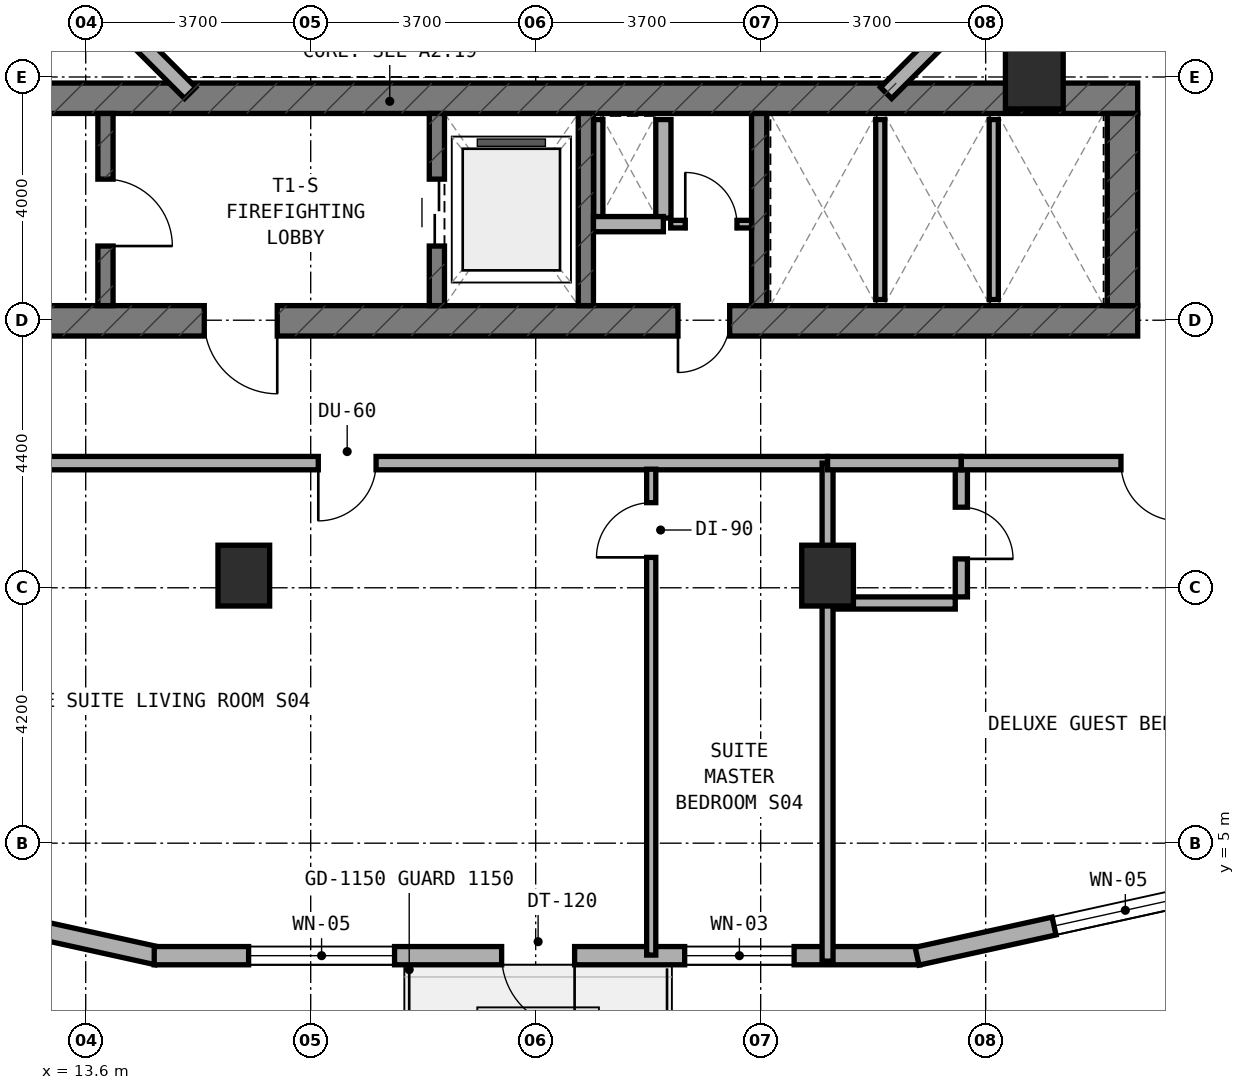
"""IFC4 building model, lengths in metres.
Left out: names, types, materials, properties, quantities, classifications, styles, units other than length and angle.
Written with IfcOpenShell. Run it as: python <this file> out.ifc"""

import sys

from ifc_helpers import new_model, si_unit, direction, frame, frame_2d, origin, origin_2d, place, context, subcontext, project, spatial, rectangle, extrude, element, fill, save


model = new_model("IFC4")
c1 = context("Model", 3, precision=1e-05, world=origin(), true_north=direction((0.0, 1.0)))
c2 = subcontext(c1, "Body", "Model", "MODEL_VIEW")
j1 = project(units=[si_unit("LENGTHUNIT", "METRE"), si_unit("PLANEANGLEUNIT", "RADIAN")], contexts=[c1])
p1 = place(None, origin())
s1 = spatial("IfcSite", under=j1, at=p1, CompositionType="ELEMENT")
p2 = place(p1, origin())
s2 = spatial("IfcBuilding", under=s1, at=p2, CompositionType="ELEMENT")
p3 = place(p2, frame((0.0, 0.0, 80.0)))
s3 = spatial("IfcBuildingStorey", under=s2, at=p3, CompositionType="ELEMENT", Elevation=80.0)
p4 = place(p3, frame((6.3, 13.59, 0.0), z_axis=(0.0, 0.0, 1.0), x_axis=(1.0, 0.0, 0.0)))
e1 = element("IfcWall", 1, at=p4, inside=s3, PredefinedType="SHEAR", context=c2, shape_type="SweptSolid", body=[
    extrude(rectangle(XDim=24.6, YDim=0.5, at=frame_2d((12.3, 0.0))), origin(), (0.0, 0.0, 1.0), 3.5),
])
p5 = place(p4, frame((9.25, 0.0, 0.0)))
e2 = element("IfcOpeningElement", 2, at=p5, cuts=e1, PredefinedType="OPENING", context=c2, shape_type="SweptSolid", body=[
    extrude(rectangle(XDim=1.2, YDim=2.15, at=frame_2d((0.6, 1.075))), frame((0.0, 0.26, 0.0), z_axis=(0.0, -1.0, 0.0), x_axis=(1.0, 0.0, 0.0)), (0.0, 0.0, 1.0), 0.52),
])
p6 = place(p4, frame((17.04, 0.0, 0.0)))
e3 = element("IfcOpeningElement", 3, at=p6, cuts=e1, PredefinedType="OPENING", context=c2, shape_type="SweptSolid", body=[
    extrude(rectangle(XDim=0.85, YDim=2.1, at=frame_2d((0.425, 1.05))), frame((0.0, 0.26, 0.0), z_axis=(0.0, -1.0, 0.0), x_axis=(1.0, 0.0, 0.0)), (0.0, 0.0, 1.0), 0.52),
])
p7 = place(p3, frame((6.3, 17.25, 0.0), z_axis=(0.0, 0.0, 1.0), x_axis=(1.0, 0.0, 0.0)))
e4 = element("IfcWall", 4, at=p7, inside=s3, PredefinedType="SHEAR", context=c2, shape_type="SweptSolid", body=[
    extrude(rectangle(XDim=24.6, YDim=0.5, at=frame_2d((12.3, 0.0))), origin(), (0.0, 0.0, 1.0), 3.5),
])
p8 = place(p3, frame((30.65, 13.84, 0.0), z_axis=(0.0, 0.0, 1.0), x_axis=(0.0, 1.0, 0.0)))
e5 = element("IfcWall", 5, at=p8, inside=s3, PredefinedType="SHEAR", context=c2, shape_type="SweptSolid", body=[
    extrude(rectangle(XDim=3.16, YDim=0.5, at=frame_2d((1.58, 0.0))), origin(), (0.0, 0.0, 1.0), 3.5),
])
p9 = place(p3, frame((13.925, 13.84, 0.0), z_axis=(0.0, 0.0, 1.0), x_axis=(0.0, 1.0, 0.0)))
e6 = element("IfcWall", 6, at=p9, inside=s3, PredefinedType="STANDARD", context=c2, shape_type="SweptSolid", body=[
    extrude(rectangle(XDim=3.16, YDim=0.25, at=frame_2d((1.58, 0.0))), origin(), (0.0, 0.0, 1.0), 3.22),
])
p10 = place(p9, frame((0.98, 0.0, 0.0)))
e7 = element("IfcOpeningElement", 7, at=p10, cuts=e6, PredefinedType="OPENING", context=c2, shape_type="SweptSolid", body=[
    extrude(rectangle(XDim=1.1, YDim=2.15, at=frame_2d((0.55, 1.075))), frame((0.0, 0.135, 0.0), z_axis=(0.0, -1.0, 0.0), x_axis=(1.0, 0.0, 0.0)), (0.0, 0.0, 1.0), 0.27),
])
p11 = place(p3, frame((19.375, 13.84, 0.0), z_axis=(0.0, 0.0, 1.0), x_axis=(0.0, 1.0, 0.0)))
e8 = element("IfcWall", 8, at=p11, inside=s3, PredefinedType="STANDARD", context=c2, shape_type="SweptSolid", body=[
    extrude(rectangle(XDim=3.16, YDim=0.25, at=frame_2d((1.58, 0.0))), origin(), (0.0, 0.0, 1.0), 3.22),
])
p12 = place(p11, frame((0.98, 0.0, 0.0)))
e9 = element("IfcOpeningElement", 9, at=p12, cuts=e8, PredefinedType="OPENING", context=c2, shape_type="SweptSolid", body=[
    extrude(rectangle(XDim=1.1, YDim=2.15, at=frame_2d((0.55, 1.075))), frame((0.0, 0.135, 0.0), z_axis=(0.0, -1.0, 0.0), x_axis=(1.0, 0.0, 0.0)), (0.0, 0.0, 1.0), 0.27),
])
for number, where, z_axis, x_axis in (
    (10, (21.825, 13.84, 0.0), (0.0, 0.0, 1.0), (0.0, 1.0, 0.0)),
    (11, (24.675, 13.84, 0.0), (0.0, 0.0, 1.0), (0.0, 1.0, 0.0)),
):
    element("IfcWall", number, at=place(p3, frame(where, z_axis=z_axis, x_axis=x_axis)), inside=s3, PredefinedType="STANDARD", context=c2, shape_type="SweptSolid", body=[
        extrude(rectangle(XDim=3.16, YDim=0.25, at=frame_2d((1.58, 0.0))), origin(), (0.0, 0.0, 1.0), 3.22),
    ])
for number, where, z_axis, x_axis in (
    (12, (16.2, 9.4, 0.0), (0.0, 0.0, 1.0), (1.0, 0.0, 0.0)),
    (13, (25.8, 9.4, 0.0), (0.0, 0.0, 1.0), (1.0, 0.0, 0.0)),
):
    element("IfcColumn", number, at=place(p3, frame(where, z_axis=z_axis, x_axis=x_axis)), inside=s3, PredefinedType="COLUMN", context=c2, shape_type="SweptSolid", body=[
        extrude(rectangle(XDim=0.85, YDim=1.0, at=origin_2d()), origin(), (0.0, 0.0, 1.0), 3.5),
    ])
p13 = place(p3, frame((29.2, 17.65, 0.0), z_axis=(0.0, 0.0, 1.0), x_axis=(1.0, 0.0, 0.0)))
e14 = element("IfcColumn", 14, at=p13, inside=s3, PredefinedType="COLUMN", context=c2, shape_type="SweptSolid", body=[
    extrude(rectangle(XDim=0.95, YDim=1.15, at=origin_2d()), origin(), (0.0, 0.0, 1.0), 3.5),
])
p14 = place(p3, frame((5.704, 5.148, 0.0), z_axis=(0.0, 0.0, 1.0), x_axis=(0.976539545934, -0.215338141596, 0.0)))
e15 = element("IfcWall", 15, at=p14, inside=s3, PredefinedType="STANDARD", context=c2, shape_type="SweptSolid", body=[
    extrude(rectangle(XDim=9.288, YDim=0.3, at=frame_2d((4.644, 0.0))), origin(), (0.0, 0.0, 1.0), 3.22),
])
p15 = place(p14, frame((0.408, 0.0, 0.85)))
e16 = element("IfcOpeningElement", 16, at=p15, cuts=e15, PredefinedType="OPENING", context=c2, shape_type="SweptSolid", body=[
    extrude(rectangle(XDim=1.2, YDim=1.5, at=frame_2d((0.6, 0.75))), frame((0.0, 0.16, 0.0), z_axis=(0.0, -1.0, 0.0), x_axis=(1.0, 0.0, 0.0)), (0.0, 0.0, 1.0), 0.32),
])
p16 = place(p14, frame((4.557, 0.0, 0.8)))
e17 = element("IfcOpeningElement", 17, at=p16, cuts=e15, PredefinedType="OPENING", context=c2, shape_type="SweptSolid", body=[
    extrude(rectangle(XDim=2.4, YDim=1.6, at=frame_2d((1.2, 0.8))), frame((0.0, 0.16, 0.0), z_axis=(0.0, -1.0, 0.0), x_axis=(1.0, 0.0, 0.0)), (0.0, 0.0, 1.0), 0.32),
])
p17 = place(p3, frame((14.727, 3.15, 0.0), z_axis=(0.0, 0.0, 1.0), x_axis=(1.0, 0.0, 0.0)))
e18 = element("IfcWall", 18, at=p17, inside=s3, PredefinedType="STANDARD", context=c2, shape_type="SweptSolid", body=[
    extrude(rectangle(XDim=12.591, YDim=0.3, at=frame_2d((6.295, 0.0))), origin(), (0.0, 0.0, 1.0), 3.22),
])
p18 = place(p17, frame((5.713, 0.0, 0.0)))
e19 = element("IfcOpeningElement", 19, at=p18, cuts=e18, PredefinedType="OPENING", context=c2, shape_type="SweptSolid", body=[
    extrude(rectangle(XDim=1.2, YDim=2.15, at=frame_2d((0.6, 1.075))), frame((0.0, 0.16, 0.0), z_axis=(0.0, -1.0, 0.0), x_axis=(1.0, 0.0, 0.0)), (0.0, 0.0, 1.0), 0.32),
])
p19 = place(p17, frame((1.552, 0.0, 0.8)))
e20 = element("IfcOpeningElement", 20, at=p19, cuts=e18, PredefinedType="OPENING", context=c2, shape_type="SweptSolid", body=[
    extrude(rectangle(XDim=2.4, YDim=1.6, at=frame_2d((1.2, 0.8))), frame((0.0, 0.16, 0.0), z_axis=(0.0, -1.0, 0.0), x_axis=(1.0, 0.0, 0.0)), (0.0, 0.0, 1.0), 0.32),
])
p20 = place(p17, frame((8.723, 0.0, 0.85)))
e21 = element("IfcOpeningElement", 21, at=p20, cuts=e18, PredefinedType="OPENING", context=c2, shape_type="SweptSolid", body=[
    extrude(rectangle(XDim=1.8, YDim=1.5, at=frame_2d((0.9, 0.75))), frame((0.0, 0.16, 0.0), z_axis=(0.0, -1.0, 0.0), x_axis=(1.0, 0.0, 0.0)), (0.0, 0.0, 1.0), 0.32),
])
p21 = place(p3, frame((27.272, 3.141, 0.0), z_axis=(0.0, 0.0, 1.0), x_axis=(0.976555357219, 0.21526642629, 0.0)))
e22 = element("IfcWall", 22, at=p21, inside=s3, PredefinedType="STANDARD", context=c2, shape_type="SweptSolid", body=[
    extrude(rectangle(XDim=9.323, YDim=0.3, at=frame_2d((4.661, 0.0))), origin(), (0.0, 0.0, 1.0), 3.22),
])
p22 = place(p21, frame((2.307, 0.0, 0.8)))
e23 = element("IfcOpeningElement", 23, at=p22, cuts=e22, PredefinedType="OPENING", context=c2, shape_type="SweptSolid", body=[
    extrude(rectangle(XDim=2.4, YDim=1.6, at=frame_2d((1.2, 0.8))), frame((0.0, 0.16, 0.0), z_axis=(0.0, -1.0, 0.0), x_axis=(1.0, 0.0, 0.0)), (0.0, 0.0, 1.0), 0.32),
])
p23 = place(p21, frame((7.524, 0.0, 0.85)))
e24 = element("IfcOpeningElement", 24, at=p23, cuts=e22, PredefinedType="OPENING", context=c2, shape_type="SweptSolid", body=[
    extrude(rectangle(XDim=1.5, YDim=1.5, at=frame_2d((0.75, 0.75))), frame((0.0, 0.16, 0.0), z_axis=(0.0, -1.0, 0.0), x_axis=(1.0, 0.0, 0.0)), (0.0, 0.0, 1.0), 0.32),
])
p24 = place(p3, frame((26.762, 17.338, 0.0), z_axis=(0.0, 0.0, 1.0), x_axis=(0.707059717605, 0.707153841636, 0.0)))
e25 = element("IfcWall", 25, at=p24, inside=s3, PredefinedType="STANDARD", context=c2, shape_type="SweptSolid", body=[
    extrude(rectangle(XDim=2.594, YDim=0.26, at=frame_2d((1.297, 0.0))), origin(), (0.0, 0.0, 1.0), 3.22),
])
p25 = place(p3, frame((13.484, 19.172, 0.0), z_axis=(0.0, 0.0, 1.0), x_axis=(0.707106781187, -0.707106781187, 0.0)))
e26 = element("IfcWall", 26, at=p25, inside=s3, PredefinedType="STANDARD", context=c2, shape_type="SweptSolid", body=[
    extrude(rectangle(XDim=2.594, YDim=0.26, at=frame_2d((1.297, 0.0))), origin(), (0.0, 0.0, 1.0), 3.22),
])
p26 = place(p3, frame((22.03, 15.28, 0.0), z_axis=(0.0, 0.0, 1.0), x_axis=(0.0, 1.0, 0.0)))
e27 = element("IfcWall", 27, at=p26, inside=s3, PredefinedType="PARTITIONING", context=c2, shape_type="SweptSolid", body=[
    extrude(rectangle(XDim=1.62, YDim=0.15, at=frame_2d((0.81, 0.0))), origin(), (0.0, 0.0, 1.0), 3.22),
])
p27 = place(p3, frame((23.1, 15.28, 0.0), z_axis=(0.0, 0.0, 1.0), x_axis=(0.0, 1.0, 0.0)))
e28 = element("IfcWall", 28, at=p27, inside=s3, PredefinedType="SOLIDWALL", context=c2, shape_type="SweptSolid", body=[
    extrude(rectangle(XDim=1.62, YDim=0.25, at=frame_2d((0.81, 0.0))), origin(), (0.0, 0.0, 1.0), 3.22),
])
p28 = place(p3, frame((21.95, 15.18, 0.0), z_axis=(0.0, 0.0, 1.0), x_axis=(1.0, 0.0, 0.0)))
e29 = element("IfcWall", 29, at=p28, inside=s3, PredefinedType="SOLIDWALL", context=c2, shape_type="SweptSolid", body=[
    extrude(rectangle(XDim=1.15, YDim=0.25, at=frame_2d((0.575, 0.0))), origin(), (0.0, 0.0, 1.0), 3.22),
])
p29 = place(p3, frame((23.22, 15.18, 0.0), z_axis=(0.0, 0.0, 1.0), x_axis=(1.0, 0.0, 0.0)))
e30 = element("IfcWall", 30, at=p29, inside=s3, PredefinedType="PARTITIONING", context=c2, shape_type="SweptSolid", body=[
    extrude(rectangle(XDim=1.33, YDim=0.125, at=frame_2d((0.665, 0.0))), origin(), (0.0, 0.0, 1.0), 3.22),
])
p30 = place(p29, frame((0.24, 0.0, 0.0)))
e31 = element("IfcOpeningElement", 31, at=p30, cuts=e30, PredefinedType="OPENING", context=c2, shape_type="SweptSolid", body=[
    extrude(rectangle(XDim=0.85, YDim=2.1, at=frame_2d((0.425, 1.05))), frame((0.0, 0.073, 0.0), z_axis=(0.0, -1.0, 0.0), x_axis=(1.0, 0.0, 0.0)), (0.0, 0.0, 1.0), 0.145),
])
p31 = place(p3, frame((26.667, 13.94, 0.0), z_axis=(0.0, 0.0, 1.0), x_axis=(0.0, 1.0, 0.0)))
e32 = element("IfcWall", 32, at=p31, inside=s3, PredefinedType="PARTITIONING", context=c2, shape_type="SweptSolid", body=[
    extrude(rectangle(XDim=2.96, YDim=0.15, at=frame_2d((1.48, 0.0))), origin(), (0.0, 0.0, 1.0), 3.22),
])
p32 = place(p3, frame((28.533, 13.94, 0.0), z_axis=(0.0, 0.0, 1.0), x_axis=(0.0, 1.0, 0.0)))
e33 = element("IfcWall", 33, at=p32, inside=s3, PredefinedType="PARTITIONING", context=c2, shape_type="SweptSolid", body=[
    extrude(rectangle(XDim=2.96, YDim=0.15, at=frame_2d((1.48, 0.0))), origin(), (0.0, 0.0, 1.0), 2.495),
])
p33 = place(p3, frame((10.0, 11.25, 0.0), z_axis=(0.0, 0.0, 1.0), x_axis=(1.0, 0.0, 0.0)))
e34 = element("IfcWall", 34, at=p33, inside=s3, PredefinedType="SOLIDWALL", context=c2, shape_type="SweptSolid", body=[
    extrude(rectangle(XDim=15.8, YDim=0.22, at=frame_2d((7.9, 0.0))), origin(), (0.0, 0.0, 1.0), 2.495),
])
p34 = place(p33, frame((7.425, 0.0, 0.0)))
e35 = element("IfcOpeningElement", 35, at=p34, cuts=e34, PredefinedType="OPENING", context=c2, shape_type="SweptSolid", body=[
    extrude(rectangle(XDim=0.95, YDim=2.1, at=frame_2d((0.475, 1.05))), frame((0.0, 0.12, 0.0), z_axis=(0.0, -1.0, 0.0), x_axis=(1.0, 0.0, 0.0)), (0.0, 0.0, 1.0), 0.24),
])
p35 = place(p3, frame((22.9, 3.16, 0.0), z_axis=(0.0, 0.0, 1.0), x_axis=(0.0, 1.0, 0.0)))
e36 = element("IfcWall", 36, at=p35, inside=s3, PredefinedType="PARTITIONING", context=c2, shape_type="SweptSolid", body=[
    extrude(rectangle(XDim=7.99, YDim=0.15, at=frame_2d((3.995, 0.0))), origin(), (0.0, 0.0, 1.0), 2.745),
])
p36 = place(p35, frame((6.54, 0.0, 0.0)))
e37 = element("IfcOpeningElement", 37, at=p36, cuts=e36, PredefinedType="OPENING", context=c2, shape_type="SweptSolid", body=[
    extrude(rectangle(XDim=0.9, YDim=2.1, at=frame_2d((0.45, 1.05))), frame((0.0, 0.085, 0.0), z_axis=(0.0, -1.0, 0.0), x_axis=(1.0, 0.0, 0.0)), (0.0, 0.0, 1.0), 0.17),
])
p37 = place(p3, frame((25.8, 3.06, 0.0), z_axis=(0.0, 0.0, 1.0), x_axis=(0.0, 1.0, 0.0)))
e38 = element("IfcWall", 38, at=p37, inside=s3, PredefinedType="SOLIDWALL", context=c2, shape_type="SweptSolid", body=[
    extrude(rectangle(XDim=8.19, YDim=0.18, at=frame_2d((4.095, 0.0))), origin(), (0.0, 0.0, 1.0), 2.495),
])
p38 = place(p3, frame((28.0, 9.05, 0.0), z_axis=(0.0, 0.0, 1.0), x_axis=(0.0, 1.0, 0.0)))
e39 = element("IfcWall", 39, at=p38, inside=s3, PredefinedType="PLUMBINGWALL", context=c2, shape_type="SweptSolid", body=[
    extrude(rectangle(XDim=2.1, YDim=0.2, at=frame_2d((1.05, 0.0))), origin(), (0.0, 0.0, 1.0), 2.745),
])
p39 = place(p38, frame((0.625, 0.0, 0.0)))
e40 = element("IfcOpeningElement", 40, at=p39, cuts=e39, PredefinedType="OPENING", context=c2, shape_type="SweptSolid", body=[
    extrude(rectangle(XDim=0.85, YDim=2.1, at=frame_2d((0.425, 1.05))), frame((0.0, 0.11, 0.0), z_axis=(0.0, -1.0, 0.0), x_axis=(1.0, 0.0, 0.0)), (0.0, 0.0, 1.0), 0.22),
])
p40 = place(p3, frame((25.9, 8.95, 0.0), z_axis=(0.0, 0.0, 1.0), x_axis=(1.0, 0.0, 0.0)))
e41 = element("IfcWall", 41, at=p40, inside=s3, PredefinedType="PLUMBINGWALL", context=c2, shape_type="SweptSolid", body=[
    extrude(rectangle(XDim=2.0, YDim=0.2, at=frame_2d((1.0, 0.0))), origin(), (0.0, 0.0, 1.0), 3.22),
])
p41 = place(p3, frame((25.8, 11.25, 0.0), z_axis=(0.0, 0.0, 1.0), x_axis=(1.0, 0.0, 0.0)))
e42 = element("IfcWall", 42, at=p41, inside=s3, PredefinedType="SOLIDWALL", context=c2, shape_type="SweptSolid", body=[
    extrude(rectangle(XDim=2.2, YDim=0.22, at=frame_2d((1.1, 0.0))), origin(), (0.0, 0.0, 1.0), 2.495),
])
p42 = place(p3, frame((28.0, 11.25, 0.0), z_axis=(0.0, 0.0, 1.0), x_axis=(1.0, 0.0, 0.0)))
e43 = element("IfcWall", 43, at=p42, inside=s3, PredefinedType="SOLIDWALL", context=c2, shape_type="SweptSolid", body=[
    extrude(rectangle(XDim=6.2, YDim=0.22, at=frame_2d((3.1, 0.0))), origin(), (0.0, 0.0, 1.0), 2.495),
])
p43 = place(p42, frame((2.625, 0.0, 0.0)))
e44 = element("IfcOpeningElement", 44, at=p43, cuts=e43, PredefinedType="OPENING", context=c2, shape_type="SweptSolid", body=[
    extrude(rectangle(XDim=0.95, YDim=2.1, at=frame_2d((0.475, 1.05))), frame((0.0, 0.12, 0.0), z_axis=(0.0, -1.0, 0.0), x_axis=(1.0, 0.0, 0.0)), (0.0, 0.0, 1.0), 0.24),
])
p44 = place(p18, frame((1.2, 0.0, 0.0), z_axis=(0.0, 0.0, 1.0), x_axis=(-1.0, 0.0, 0.0)))
e45 = element("IfcDoor", 45, at=p44, inside=s3, OperationType="SINGLE_SWING_LEFT", PredefinedType="DOOR", context=c2, shape_type="SweptSolid", body=[
    extrude(rectangle(XDim=1.2, YDim=2.15, at=frame_2d((0.6, 1.075))), frame((0.0, 0.025, 0.0), z_axis=(0.0, -1.0, 0.0), x_axis=(1.0, 0.0, 0.0)), (0.0, 0.0, 1.0), 0.05),
])
fill(e19, e45)
p45 = place(p19, origin())
e46 = element("IfcWindow", 46, at=p45, inside=s3, PartitioningType="SINGLE_PANEL", PredefinedType="WINDOW", context=c2, shape_type="SweptSolid", body=[
    extrude(rectangle(XDim=2.4, YDim=1.6, at=frame_2d((1.2, 0.8))), frame((0.0, 0.03, 0.0), z_axis=(0.0, -1.0, 0.0), x_axis=(1.0, 0.0, 0.0)), (0.0, 0.0, 1.0), 0.06),
])
fill(e20, e46)
p46 = place(p20, origin())
e47 = element("IfcWindow", 47, at=p46, inside=s3, PartitioningType="SINGLE_PANEL", PredefinedType="WINDOW", context=c2, shape_type="SweptSolid", body=[
    extrude(rectangle(XDim=1.8, YDim=1.5, at=frame_2d((0.9, 0.75))), frame((0.0, 0.03, 0.0), z_axis=(0.0, -1.0, 0.0), x_axis=(1.0, 0.0, 0.0)), (0.0, 0.0, 1.0), 0.06),
])
fill(e21, e47)
p47 = place(p22, origin())
e48 = element("IfcWindow", 48, at=p47, inside=s3, PartitioningType="SINGLE_PANEL", PredefinedType="WINDOW", context=c2, shape_type="SweptSolid", body=[
    extrude(rectangle(XDim=2.4, YDim=1.6, at=frame_2d((1.2, 0.8))), frame((0.0, 0.03, 0.0), z_axis=(0.0, -1.0, 0.0), x_axis=(1.0, 0.0, 0.0)), (0.0, 0.0, 1.0), 0.06),
])
fill(e23, e48)
p48 = place(p10, frame((1.1, 0.0, 0.0), z_axis=(0.0, 0.0, 1.0), x_axis=(-1.0, 0.0, 0.0)))
e49 = element("IfcDoor", 49, at=p48, inside=s3, OperationType="SINGLE_SWING_RIGHT", PredefinedType="DOOR", context=c2, shape_type="SweptSolid", body=[
    extrude(rectangle(XDim=1.1, YDim=2.15, at=frame_2d((0.55, 1.075))), frame((0.0, 0.025, 0.0), z_axis=(0.0, -1.0, 0.0), x_axis=(1.0, 0.0, 0.0)), (0.0, 0.0, 1.0), 0.05),
])
fill(e7, e49)
p49 = place(p5, frame((1.2, 0.0, 0.0), z_axis=(0.0, 0.0, 1.0), x_axis=(-1.0, 0.0, 0.0)))
e50 = element("IfcDoor", 50, at=p49, inside=s3, OperationType="SINGLE_SWING_LEFT", PredefinedType="DOOR", context=c2, shape_type="SweptSolid", body=[
    extrude(rectangle(XDim=1.2, YDim=2.15, at=frame_2d((0.6, 1.075))), frame((0.0, 0.025, 0.0), z_axis=(0.0, -1.0, 0.0), x_axis=(1.0, 0.0, 0.0)), (0.0, 0.0, 1.0), 0.05),
])
fill(e2, e50)
p50 = place(p12, origin())
e51 = element("IfcDoor", 51, at=p50, inside=s3, OperationType="DOUBLE_DOOR_SLIDING", PredefinedType="DOOR", context=c2, shape_type="SweptSolid", body=[
    extrude(rectangle(XDim=1.1, YDim=2.15, at=frame_2d((0.55, 1.075))), frame((0.0, 0.025, 0.0), z_axis=(0.0, -1.0, 0.0), x_axis=(1.0, 0.0, 0.0)), (0.0, 0.0, 1.0), 0.05),
])
fill(e9, e51)
p51 = place(p6, frame((0.85, 0.0, 0.0), z_axis=(0.0, 0.0, 1.0), x_axis=(-1.0, 0.0, 0.0)))
e52 = element("IfcDoor", 52, at=p51, inside=s3, OperationType="SINGLE_SWING_RIGHT", PredefinedType="DOOR", context=c2, shape_type="SweptSolid", body=[
    extrude(rectangle(XDim=0.85, YDim=2.1, at=frame_2d((0.425, 1.05))), frame((0.0, 0.025, 0.0), z_axis=(0.0, -1.0, 0.0), x_axis=(1.0, 0.0, 0.0)), (0.0, 0.0, 1.0), 0.05),
])
fill(e3, e52)
p52 = place(p30, origin())
e53 = element("IfcDoor", 53, at=p52, inside=s3, OperationType="SINGLE_SWING_LEFT", PredefinedType="DOOR", context=c2, shape_type="SweptSolid", body=[
    extrude(rectangle(XDim=0.85, YDim=2.1, at=frame_2d((0.425, 1.05))), frame((0.0, 0.025, 0.0), z_axis=(0.0, -1.0, 0.0), x_axis=(1.0, 0.0, 0.0)), (0.0, 0.0, 1.0), 0.05),
])
fill(e31, e53)
p53 = place(p34, frame((0.95, 0.0, 0.0), z_axis=(0.0, 0.0, 1.0), x_axis=(-1.0, 0.0, 0.0)))
e54 = element("IfcDoor", 54, at=p53, inside=s3, OperationType="SINGLE_SWING_RIGHT", PredefinedType="DOOR", context=c2, shape_type="SweptSolid", body=[
    extrude(rectangle(XDim=0.95, YDim=2.1, at=frame_2d((0.475, 1.05))), frame((0.0, 0.025, 0.0), z_axis=(0.0, -1.0, 0.0), x_axis=(1.0, 0.0, 0.0)), (0.0, 0.0, 1.0), 0.05),
])
fill(e35, e54)
p54 = place(p36, origin())
e55 = element("IfcDoor", 55, at=p54, inside=s3, OperationType="SINGLE_SWING_LEFT", PredefinedType="DOOR", context=c2, shape_type="SweptSolid", body=[
    extrude(rectangle(XDim=0.9, YDim=2.1, at=frame_2d((0.45, 1.05))), frame((0.0, 0.025, 0.0), z_axis=(0.0, -1.0, 0.0), x_axis=(1.0, 0.0, 0.0)), (0.0, 0.0, 1.0), 0.05),
])
fill(e37, e55)
p55 = place(p39, frame((0.85, 0.0, 0.0), z_axis=(0.0, 0.0, 1.0), x_axis=(-1.0, 0.0, 0.0)))
e56 = element("IfcDoor", 56, at=p55, inside=s3, OperationType="SINGLE_SWING_RIGHT", PredefinedType="DOOR", context=c2, shape_type="SweptSolid", body=[
    extrude(rectangle(XDim=0.85, YDim=2.1, at=frame_2d((0.425, 1.05))), frame((0.0, 0.025, 0.0), z_axis=(0.0, -1.0, 0.0), x_axis=(1.0, 0.0, 0.0)), (0.0, 0.0, 1.0), 0.05),
])
fill(e40, e56)
p56 = place(p43, frame((0.95, 0.0, 0.0), z_axis=(0.0, 0.0, 1.0), x_axis=(-1.0, 0.0, 0.0)))
e57 = element("IfcDoor", 57, at=p56, inside=s3, OperationType="SINGLE_SWING_LEFT", PredefinedType="DOOR", context=c2, shape_type="SweptSolid", body=[
    extrude(rectangle(XDim=0.95, YDim=2.1, at=frame_2d((0.475, 1.05))), frame((0.0, 0.025, 0.0), z_axis=(0.0, -1.0, 0.0), x_axis=(1.0, 0.0, 0.0)), (0.0, 0.0, 1.0), 0.05),
])
fill(e44, e57)
save(model, sys.argv[1])
